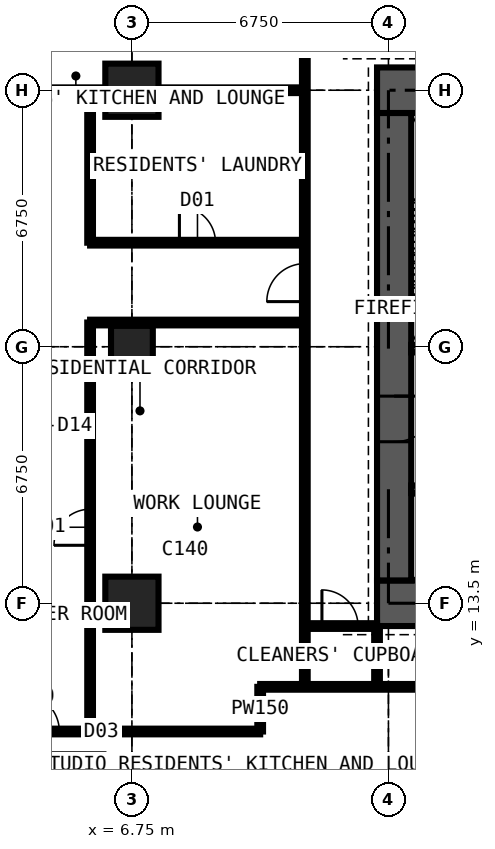
"""IFC4 building model, lengths in metres.
Left out: names, types, materials, properties, quantities, classifications, styles, units other than length and angle.
Written with IfcOpenShell. Run it as: python <this file> out.ifc"""

import sys

from ifc_helpers import new_model, si_unit, direction, frame, frame_2d, origin, origin_2d, place, context, subcontext, project, spatial, rectangle, extrude, element, fill, save


model = new_model("IFC4")
c1 = context("Model", 3, precision=1e-05, world=origin(), true_north=direction((0.0, 1.0)))
c2 = subcontext(c1, "Body", "Model", "MODEL_VIEW")
j1 = project(units=[si_unit("LENGTHUNIT", "METRE"), si_unit("PLANEANGLEUNIT", "RADIAN")], contexts=[c1])
p1 = place(None, origin())
s1 = spatial("IfcSite", under=j1, at=p1, CompositionType="ELEMENT")
p2 = place(p1, origin())
s2 = spatial("IfcBuilding", under=s1, at=p2, CompositionType="ELEMENT")
p3 = place(p2, frame((0.0, 0.0, 204.3)))
s3 = spatial("IfcBuildingStorey", under=s2, at=p3, CompositionType="ELEMENT", Elevation=204.3)
p4 = place(p3, frame((6.75, 13.5, 0.0), z_axis=(0.0, 0.0, 1.0), x_axis=(1.0, 0.0, 0.0)))
e1 = element("IfcColumn", 1, at=p4, inside=s3, PredefinedType="COLUMN", context=c2, shape_type="SweptSolid", body=[
    extrude(rectangle(XDim=1.4, YDim=1.4, at=origin_2d()), origin(), (0.0, 0.0, 1.0), 3.6),
])
p5 = place(p3, frame((6.75, 20.25, 0.0), z_axis=(0.0, 0.0, 1.0), x_axis=(1.0, 0.0, 0.0)))
e2 = element("IfcColumn", 2, at=p5, inside=s3, PredefinedType="COLUMN", context=c2, shape_type="SweptSolid", body=[
    extrude(rectangle(XDim=1.1, YDim=1.1, at=origin_2d()), origin(), (0.0, 0.0, 1.0), 3.6),
])
p6 = place(p3, frame((6.75, 27.0, 0.0), z_axis=(0.0, 0.0, 1.0), x_axis=(1.0, 0.0, 0.0)))
e3 = element("IfcColumn", 3, at=p6, inside=s3, PredefinedType="COLUMN", context=c2, shape_type="SweptSolid", body=[
    extrude(rectangle(XDim=1.4, YDim=1.4, at=origin_2d()), origin(), (0.0, 0.0, 1.0), 3.6),
])
p7 = place(p3, frame((13.2, 13.5, 0.0), z_axis=(0.0, 0.0, 1.0), x_axis=(1.0, 0.0, 0.0)))
e4 = element("IfcWall", 4, at=p7, inside=s3, PredefinedType="SHEAR", context=c2, shape_type="SweptSolid", body=[
    extrude(rectangle(XDim=14.1, YDim=1.2, at=frame_2d((7.05, 0.0))), origin(), (0.0, 0.0, 1.0), 3.6),
])
p8 = place(p3, frame((27.3, 27.0, 0.0), z_axis=(0.0, 0.0, 1.0), x_axis=(-1.0, 0.0, 0.0)))
e5 = element("IfcWall", 5, at=p8, inside=s3, PredefinedType="SHEAR", context=c2, shape_type="SweptSolid", body=[
    extrude(rectangle(XDim=14.1, YDim=1.2, at=frame_2d((7.05, 0.0))), origin(), (0.0, 0.0, 1.0), 3.6),
])
p9 = place(p8, frame((5.225, 0.0, 0.0)))
e6 = element("IfcOpeningElement", 6, at=p9, cuts=e5, PredefinedType="OPENING", context=c2, shape_type="SweptSolid", body=[
    extrude(rectangle(XDim=0.9, YDim=2.2, at=frame_2d((0.45, 1.1))), frame((0.0, 0.61, 0.0), z_axis=(0.0, -1.0, 0.0), x_axis=(1.0, 0.0, 0.0)), (0.0, 0.0, 1.0), 1.22),
])
p10 = place(p8, frame((8.2, 0.0, 0.0)))
e7 = element("IfcOpeningElement", 7, at=p10, cuts=e5, PredefinedType="OPENING", context=c2, shape_type="SweptSolid", body=[
    extrude(rectangle(XDim=1.0, YDim=2.2, at=frame_2d((0.5, 1.1))), frame((0.0, 0.61, 0.0), z_axis=(0.0, -1.0, 0.0), x_axis=(1.0, 0.0, 0.0)), (0.0, 0.0, 1.0), 1.22),
])
p11 = place(p3, frame((13.65, 26.4, 0.0), z_axis=(0.0, 0.0, 1.0), x_axis=(0.0, -1.0, 0.0)))
e8 = element("IfcWall", 8, at=p11, inside=s3, PredefinedType="SHEAR", context=c2, shape_type="SweptSolid", body=[
    extrude(rectangle(XDim=12.3, YDim=0.9, at=frame_2d((6.15, 0.0))), origin(), (0.0, 0.0, 1.0), 3.6),
])
p12 = place(p11, frame((7.45, 0.0, 0.0)))
e9 = element("IfcOpeningElement", 9, at=p12, cuts=e8, PredefinedType="OPENING", context=c2, shape_type="SweptSolid", body=[
    extrude(rectangle(XDim=1.2, YDim=2.2, at=frame_2d((0.6, 1.1))), frame((0.0, 0.46, 0.0), z_axis=(0.0, -1.0, 0.0), x_axis=(1.0, 0.0, 0.0)), (0.0, 0.0, 1.0), 0.92),
])
p13 = place(p3, frame((2.625, 9.375, 0.0), z_axis=(0.0, 0.0, 1.0), x_axis=(1.0, 0.0, 0.0)))
e10 = element("IfcWall", 10, at=p13, inside=s3, PredefinedType="SOLIDWALL", context=c2, shape_type="SweptSolid", body=[
    extrude(rectangle(XDim=3.375, YDim=0.3, at=frame_2d((1.688, 0.0))), origin(), (0.0, 0.0, 1.0), 3.375),
])
p14 = place(p13, frame((0.788, 0.0, 0.6)))
e11 = element("IfcOpeningElement", 11, at=p14, cuts=e10, PredefinedType="OPENING", context=c2, shape_type="SweptSolid", body=[
    extrude(rectangle(XDim=1.8, YDim=2.1, at=frame_2d((0.9, 1.05))), frame((0.0, 0.16, 0.0), z_axis=(0.0, -1.0, 0.0), x_axis=(1.0, 0.0, 0.0)), (0.0, 0.0, 1.0), 0.32),
])
p15 = place(p3, frame((6.0, 9.375, 0.0), z_axis=(0.0, 0.0, 1.0), x_axis=(0.0, -1.0, 0.0)))
e12 = element("IfcWall", 12, at=p15, inside=s3, PredefinedType="SOLIDWALL", context=c2, shape_type="SweptSolid", body=[
    extrude(rectangle(XDim=3.375, YDim=0.3, at=frame_2d((1.688, 0.0))), origin(), (0.0, 0.0, 1.0), 3.375),
])
p16 = place(p15, frame((0.788, 0.0, 0.6)))
e13 = element("IfcOpeningElement", 13, at=p16, cuts=e12, PredefinedType="OPENING", context=c2, shape_type="SweptSolid", body=[
    extrude(rectangle(XDim=1.8, YDim=2.1, at=frame_2d((0.9, 1.05))), frame((0.0, 0.16, 0.0), z_axis=(0.0, -1.0, 0.0), x_axis=(1.0, 0.0, 0.0)), (0.0, 0.0, 1.0), 0.32),
])
p17 = place(p3, frame((14.1, 16.5, 0.0), z_axis=(0.0, 0.0, 1.0), x_axis=(1.0, 0.0, 0.0)))
e14 = element("IfcWall", 14, at=p17, inside=s3, PredefinedType="SHEAR", context=c2, shape_type="SweptSolid", body=[
    extrude(rectangle(XDim=12.3, YDim=0.2, at=frame_2d((6.15, 0.0))), origin(), (0.0, 0.0, 1.0), 3.6),
])
p18 = place(p17, frame((0.9, 0.0, 0.0)))
e15 = element("IfcOpeningElement", 15, at=p18, cuts=e14, PredefinedType="OPENING", context=c2, shape_type="SweptSolid", body=[
    extrude(rectangle(XDim=1.1, YDim=2.2, at=frame_2d((0.55, 1.1))), frame((0.0, 0.11, 0.0), z_axis=(0.0, -1.0, 0.0), x_axis=(1.0, 0.0, 0.0)), (0.0, 0.0, 1.0), 0.22),
])
p19 = place(p17, frame((4.31, 0.0, 0.0)))
e16 = element("IfcOpeningElement", 16, at=p19, cuts=e14, PredefinedType="OPENING", context=c2, shape_type="SweptSolid", body=[
    extrude(rectangle(XDim=1.1, YDim=2.2, at=frame_2d((0.55, 1.1))), frame((0.0, 0.11, 0.0), z_axis=(0.0, -1.0, 0.0), x_axis=(1.0, 0.0, 0.0)), (0.0, 0.0, 1.0), 0.22),
])
p20 = place(p17, frame((6.45, 0.0, 0.0)))
e17 = element("IfcOpeningElement", 17, at=p20, cuts=e14, PredefinedType="OPENING", context=c2, shape_type="SweptSolid", body=[
    extrude(rectangle(XDim=1.1, YDim=2.2, at=frame_2d((0.55, 1.1))), frame((0.0, 0.11, 0.0), z_axis=(0.0, -1.0, 0.0), x_axis=(1.0, 0.0, 0.0)), (0.0, 0.0, 1.0), 0.22),
])
p21 = place(p17, frame((9.5, 0.0, 0.0)))
e18 = element("IfcOpeningElement", 18, at=p21, cuts=e14, PredefinedType="OPENING", context=c2, shape_type="SweptSolid", body=[
    extrude(rectangle(XDim=1.1, YDim=2.2, at=frame_2d((0.55, 1.1))), frame((0.0, 0.11, 0.0), z_axis=(0.0, -1.0, 0.0), x_axis=(1.0, 0.0, 0.0)), (0.0, 0.0, 1.0), 0.22),
])
p22 = place(p3, frame((14.1, 20.2, 0.0), z_axis=(0.0, 0.0, 1.0), x_axis=(1.0, 0.0, 0.0)))
e19 = element("IfcWall", 19, at=p22, inside=s3, PredefinedType="SHEAR", context=c2, shape_type="SweptSolid", body=[
    extrude(rectangle(XDim=12.3, YDim=0.2, at=frame_2d((6.15, 0.0))), origin(), (0.0, 0.0, 1.0), 3.6),
])
p23 = place(p22, frame((4.56, 0.0, 0.0)))
e20 = element("IfcOpeningElement", 20, at=p23, cuts=e19, PredefinedType="OPENING", context=c2, shape_type="SweptSolid", body=[
    extrude(rectangle(XDim=1.1, YDim=2.2, at=frame_2d((0.55, 1.1))), frame((0.0, 0.11, 0.0), z_axis=(0.0, -1.0, 0.0), x_axis=(1.0, 0.0, 0.0)), (0.0, 0.0, 1.0), 0.22),
])
p24 = place(p22, frame((6.7, 0.0, 0.0)))
e21 = element("IfcOpeningElement", 21, at=p24, cuts=e19, PredefinedType="OPENING", context=c2, shape_type="SweptSolid", body=[
    extrude(rectangle(XDim=1.1, YDim=2.2, at=frame_2d((0.55, 1.1))), frame((0.0, 0.11, 0.0), z_axis=(0.0, -1.0, 0.0), x_axis=(1.0, 0.0, 0.0)), (0.0, 0.0, 1.0), 0.22),
])
p25 = place(p22, frame((0.35, 0.0, 0.0)))
e22 = element("IfcOpeningElement", 22, at=p25, cuts=e19, PredefinedType="OPENING", context=c2, shape_type="SweptSolid", body=[
    extrude(rectangle(XDim=1.1, YDim=2.2, at=frame_2d((0.55, 1.1))), frame((0.0, 0.11, 0.0), z_axis=(0.0, -1.0, 0.0), x_axis=(1.0, 0.0, 0.0)), (0.0, 0.0, 1.0), 0.22),
])
p26 = place(p22, frame((9.75, 0.0, 0.0)))
e23 = element("IfcOpeningElement", 23, at=p26, cuts=e19, PredefinedType="OPENING", context=c2, shape_type="SweptSolid", body=[
    extrude(rectangle(XDim=1.1, YDim=2.2, at=frame_2d((0.55, 1.1))), frame((0.0, 0.11, 0.0), z_axis=(0.0, -1.0, 0.0), x_axis=(1.0, 0.0, 0.0)), (0.0, 0.0, 1.0), 0.22),
])
p27 = place(p3, frame((2.775, 10.125, 0.0), z_axis=(0.0, 0.0, 1.0), x_axis=(1.0, 0.0, 0.0)))
e24 = element("IfcWall", 24, at=p27, inside=s3, PredefinedType="PARTITIONING", context=c2, shape_type="SweptSolid", body=[
    extrude(rectangle(XDim=7.35, YDim=0.15, at=frame_2d((3.675, 0.0))), origin(), (0.0, 0.0, 1.0), 2.877),
])
p28 = place(p27, frame((1.066, 0.0, 0.0)))
e25 = element("IfcOpeningElement", 25, at=p28, cuts=e24, PredefinedType="OPENING", context=c2, shape_type="SweptSolid", body=[
    extrude(rectangle(XDim=1.0, YDim=2.2, at=frame_2d((0.5, 1.1))), frame((0.0, 0.085, 0.0), z_axis=(0.0, -1.0, 0.0), x_axis=(1.0, 0.0, 0.0)), (0.0, 0.0, 1.0), 0.17),
])
p29 = place(p3, frame((4.15, 27.0, 0.0), z_axis=(0.0, 0.0, 1.0), x_axis=(1.0, 0.0, 0.0)))
e26 = element("IfcWall", 26, at=p29, inside=s3, PredefinedType="PARTITIONING", context=c2, shape_type="SweptSolid", body=[
    extrude(rectangle(XDim=7.15, YDim=0.15, at=frame_2d((3.575, 0.0))), origin(), (0.0, 0.0, 1.0), 2.806),
])
p30 = place(p3, frame((5.65, 10.125, 0.0), z_axis=(0.0, 0.0, 1.0), x_axis=(0.0, 1.0, 0.0)))
e27 = element("IfcWall", 27, at=p30, inside=s3, PredefinedType="PARTITIONING", context=c2, shape_type="SweptSolid", body=[
    extrude(rectangle(XDim=10.762, YDim=0.15, at=frame_2d((5.381, 0.0))), origin(), (0.0, 0.0, 1.0), 3.375),
])
p31 = place(p30, frame((4.9, 0.0, 0.0)))
e28 = element("IfcOpeningElement", 28, at=p31, cuts=e27, PredefinedType="OPENING", context=c2, shape_type="SweptSolid", body=[
    extrude(rectangle(XDim=0.95, YDim=2.2, at=frame_2d((0.475, 1.1))), frame((0.0, 0.085, 0.0), z_axis=(0.0, -1.0, 0.0), x_axis=(1.0, 0.0, 0.0)), (0.0, 0.0, 1.0), 0.17),
])
p32 = place(p3, frame((5.65, 20.887, 0.0), z_axis=(0.0, 0.0, 1.0), x_axis=(1.0, 0.0, 0.0)))
e29 = element("IfcWall", 29, at=p32, inside=s3, PredefinedType="PARTITIONING", context=c2, shape_type="SweptSolid", body=[
    extrude(rectangle(XDim=5.65, YDim=0.15, at=frame_2d((2.825, 0.0))), origin(), (0.0, 0.0, 1.0), 3.375),
])
p33 = place(p3, frame((5.65, 22.988, 0.0), z_axis=(0.0, 0.0, 1.0), x_axis=(0.0, 1.0, 0.0)))
e30 = element("IfcWall", 30, at=p33, inside=s3, PredefinedType="PARTITIONING", context=c2, shape_type="SweptSolid", body=[
    extrude(rectangle(XDim=4.012, YDim=0.15, at=frame_2d((2.006, 0.0))), origin(), (0.0, 0.0, 1.0), 3.375),
])
p34 = place(p3, frame((5.65, 22.988, 0.0), z_axis=(0.0, 0.0, 1.0), x_axis=(1.0, 0.0, 0.0)))
e31 = element("IfcWall", 31, at=p34, inside=s3, PredefinedType="PARTITIONING", context=c2, shape_type="SweptSolid", body=[
    extrude(rectangle(XDim=5.65, YDim=0.15, at=frame_2d((2.825, 0.0))), origin(), (0.0, 0.0, 1.0), 3.375),
])
p35 = place(p34, frame((2.35, 0.0, 0.0)))
e32 = element("IfcOpeningElement", 32, at=p35, cuts=e31, PredefinedType="OPENING", context=c2, shape_type="SweptSolid", body=[
    extrude(rectangle(XDim=0.95, YDim=2.2, at=frame_2d((0.475, 1.1))), frame((0.0, 0.085, 0.0), z_axis=(0.0, -1.0, 0.0), x_axis=(1.0, 0.0, 0.0)), (0.0, 0.0, 1.0), 0.17),
])
p36 = place(p3, frame((10.125, 10.125, 0.0), z_axis=(0.0, 0.0, 1.0), x_axis=(0.0, 1.0, 0.0)))
e33 = element("IfcWall", 33, at=p36, inside=s3, PredefinedType="PARTITIONING", context=c2, shape_type="SweptSolid", body=[
    extrude(rectangle(XDim=1.175, YDim=0.15, at=frame_2d((0.587, 0.0))), origin(), (0.0, 0.0, 1.0), 3.375),
])
p37 = place(p3, frame((10.125, 11.3, 0.0), z_axis=(0.0, 0.0, 1.0), x_axis=(1.0, 0.0, 0.0)))
e34 = element("IfcWall", 34, at=p37, inside=s3, PredefinedType="PARTITIONING", context=c2, shape_type="SweptSolid", body=[
    extrude(rectangle(XDim=20.25, YDim=0.15, at=frame_2d((10.125, 0.0))), origin(), (0.0, 0.0, 1.0), 3.375),
])
p38 = place(p37, frame((11.725, 0.0, 0.0)))
e35 = element("IfcOpeningElement", 35, at=p38, cuts=e34, PredefinedType="OPENING", context=c2, shape_type="SweptSolid", body=[
    extrude(rectangle(XDim=0.95, YDim=2.2, at=frame_2d((0.475, 1.1))), frame((0.0, 0.085, 0.0), z_axis=(0.0, -1.0, 0.0), x_axis=(1.0, 0.0, 0.0)), (0.0, 0.0, 1.0), 0.17),
])
p39 = place(p37, frame((17.475, 0.0, 0.0)))
e36 = element("IfcOpeningElement", 36, at=p39, cuts=e34, PredefinedType="OPENING", context=c2, shape_type="SweptSolid", body=[
    extrude(rectangle(XDim=1.0, YDim=2.2, at=frame_2d((0.5, 1.1))), frame((0.0, 0.085, 0.0), z_axis=(0.0, -1.0, 0.0), x_axis=(1.0, 0.0, 0.0)), (0.0, 0.0, 1.0), 0.17),
])
p40 = place(p37, frame((7.95, 0.0, 0.0)))
e37 = element("IfcOpeningElement", 37, at=p40, cuts=e34, PredefinedType="OPENING", context=c2, shape_type="SweptSolid", body=[
    extrude(rectangle(XDim=0.95, YDim=2.2, at=frame_2d((0.475, 1.1))), frame((0.0, 0.085, 0.0), z_axis=(0.0, -1.0, 0.0), x_axis=(1.0, 0.0, 0.0)), (0.0, 0.0, 1.0), 0.17),
])
p41 = place(p3, frame((11.3, 11.3, 0.0), z_axis=(0.0, 0.0, 1.0), x_axis=(0.0, 1.0, 0.0)))
e38 = element("IfcWall", 38, at=p41, inside=s3, PredefinedType="PARTITIONING", context=c2, shape_type="SweptSolid", body=[
    extrude(rectangle(XDim=19.3, YDim=0.15, at=frame_2d((9.65, 0.0))), origin(), (0.0, 0.0, 1.0), 3.375),
])
p42 = place(p41, frame((18.1, 0.0, 0.0)))
e39 = element("IfcOpeningElement", 39, at=p42, cuts=e38, PredefinedType="OPENING", context=c2, shape_type="SweptSolid", body=[
    extrude(rectangle(XDim=1.0, YDim=2.2, at=frame_2d((0.5, 1.1))), frame((0.0, 0.085, 0.0), z_axis=(0.0, -1.0, 0.0), x_axis=(1.0, 0.0, 0.0)), (0.0, 0.0, 1.0), 0.17),
])
p43 = place(p41, frame((10.137, 0.0, 0.0)))
e40 = element("IfcOpeningElement", 40, at=p43, cuts=e38, PredefinedType="OPENING", context=c2, shape_type="SweptSolid", body=[
    extrude(rectangle(XDim=1.0, YDim=2.2, at=frame_2d((0.5, 1.1))), frame((0.0, 0.085, 0.0), z_axis=(0.0, -1.0, 0.0), x_axis=(1.0, 0.0, 0.0)), (0.0, 0.0, 1.0), 0.17),
])
p44 = place(p3, frame((11.3, 12.9, 0.0), z_axis=(0.0, 0.0, 1.0), x_axis=(1.0, 0.0, 0.0)))
e41 = element("IfcWall", 41, at=p44, inside=s3, PredefinedType="PARTITIONING", context=c2, shape_type="SweptSolid", body=[
    extrude(rectangle(XDim=1.9, YDim=0.15, at=frame_2d((0.95, 0.0))), origin(), (0.0, 0.0, 1.0), 2.806),
])
p45 = place(p44, frame((0.45, 0.0, 0.0)))
e42 = element("IfcOpeningElement", 42, at=p45, cuts=e41, PredefinedType="OPENING", context=c2, shape_type="SweptSolid", body=[
    extrude(rectangle(XDim=0.95, YDim=2.2, at=frame_2d((0.475, 1.1))), frame((0.0, 0.085, 0.0), z_axis=(0.0, -1.0, 0.0), x_axis=(1.0, 0.0, 0.0)), (0.0, 0.0, 1.0), 0.17),
])
p46 = place(p3, frame((13.2, 11.3, 0.0), z_axis=(0.0, 0.0, 1.0), x_axis=(0.0, 1.0, 0.0)))
e43 = element("IfcWall", 43, at=p46, inside=s3, PredefinedType="PARTITIONING", context=c2, shape_type="SweptSolid", body=[
    extrude(rectangle(XDim=1.6, YDim=0.15, at=frame_2d((0.8, 0.0))), origin(), (0.0, 0.0, 1.0), 3.375),
])
p47 = place(p14, origin())
e44 = element("IfcWindow", 44, at=p47, inside=s3, PartitioningType="SINGLE_PANEL", PredefinedType="WINDOW", context=c2, shape_type="SweptSolid", body=[
    extrude(rectangle(XDim=1.8, YDim=2.1, at=frame_2d((0.9, 1.05))), frame((0.0, 0.03, 0.0), z_axis=(0.0, -1.0, 0.0), x_axis=(1.0, 0.0, 0.0)), (0.0, 0.0, 1.0), 0.06),
])
fill(e11, e44)
p48 = place(p12, origin())
e45 = element("IfcDoor", 45, at=p48, inside=s3, OperationType="DOUBLE_DOOR_SINGLE_SWING", PredefinedType="DOOR", context=c2, shape_type="SweptSolid", body=[
    extrude(rectangle(XDim=1.2, YDim=2.2, at=frame_2d((0.6, 1.1))), frame((0.0, 0.025, 0.0), z_axis=(0.0, -1.0, 0.0), x_axis=(1.0, 0.0, 0.0)), (0.0, 0.0, 1.0), 0.05),
])
fill(e9, e45)
p49 = place(p45, origin())
e46 = element("IfcDoor", 46, at=p49, inside=s3, OperationType="SINGLE_SWING_LEFT", PredefinedType="DOOR", context=c2, shape_type="SweptSolid", body=[
    extrude(rectangle(XDim=0.95, YDim=2.2, at=frame_2d((0.475, 1.1))), frame((0.0, 0.025, 0.0), z_axis=(0.0, -1.0, 0.0), x_axis=(1.0, 0.0, 0.0)), (0.0, 0.0, 1.0), 0.05),
])
fill(e42, e46)
p50 = place(p28, origin())
e47 = element("IfcDoor", 47, at=p50, inside=s3, OperationType="SINGLE_SWING_LEFT", PredefinedType="DOOR", context=c2, shape_type="SweptSolid", body=[
    extrude(rectangle(XDim=1.0, YDim=2.2, at=frame_2d((0.5, 1.1))), frame((0.0, 0.025, 0.0), z_axis=(0.0, -1.0, 0.0), x_axis=(1.0, 0.0, 0.0)), (0.0, 0.0, 1.0), 0.05),
])
fill(e25, e47)
p51 = place(p43, origin())
e48 = element("IfcDoor", 48, at=p51, inside=s3, OperationType="SINGLE_SWING_LEFT", PredefinedType="DOOR", context=c2, shape_type="SweptSolid", body=[
    extrude(rectangle(XDim=1.0, YDim=2.2, at=frame_2d((0.5, 1.1))), frame((0.0, 0.025, 0.0), z_axis=(0.0, -1.0, 0.0), x_axis=(1.0, 0.0, 0.0)), (0.0, 0.0, 1.0), 0.05),
])
fill(e40, e48)
p52 = place(p35, origin())
e49 = element("IfcDoor", 49, at=p52, inside=s3, OperationType="SINGLE_SWING_LEFT", PredefinedType="DOOR", context=c2, shape_type="SweptSolid", body=[
    extrude(rectangle(XDim=0.95, YDim=2.2, at=frame_2d((0.475, 1.1))), frame((0.0, 0.025, 0.0), z_axis=(0.0, -1.0, 0.0), x_axis=(1.0, 0.0, 0.0)), (0.0, 0.0, 1.0), 0.05),
])
fill(e32, e49)
p53 = place(p31, origin())
e50 = element("IfcDoor", 50, at=p53, inside=s3, OperationType="SINGLE_SWING_LEFT", PredefinedType="DOOR", context=c2, shape_type="SweptSolid", body=[
    extrude(rectangle(XDim=0.95, YDim=2.2, at=frame_2d((0.475, 1.1))), frame((0.0, 0.025, 0.0), z_axis=(0.0, -1.0, 0.0), x_axis=(1.0, 0.0, 0.0)), (0.0, 0.0, 1.0), 0.05),
])
fill(e28, e50)
save(model, sys.argv[1])
